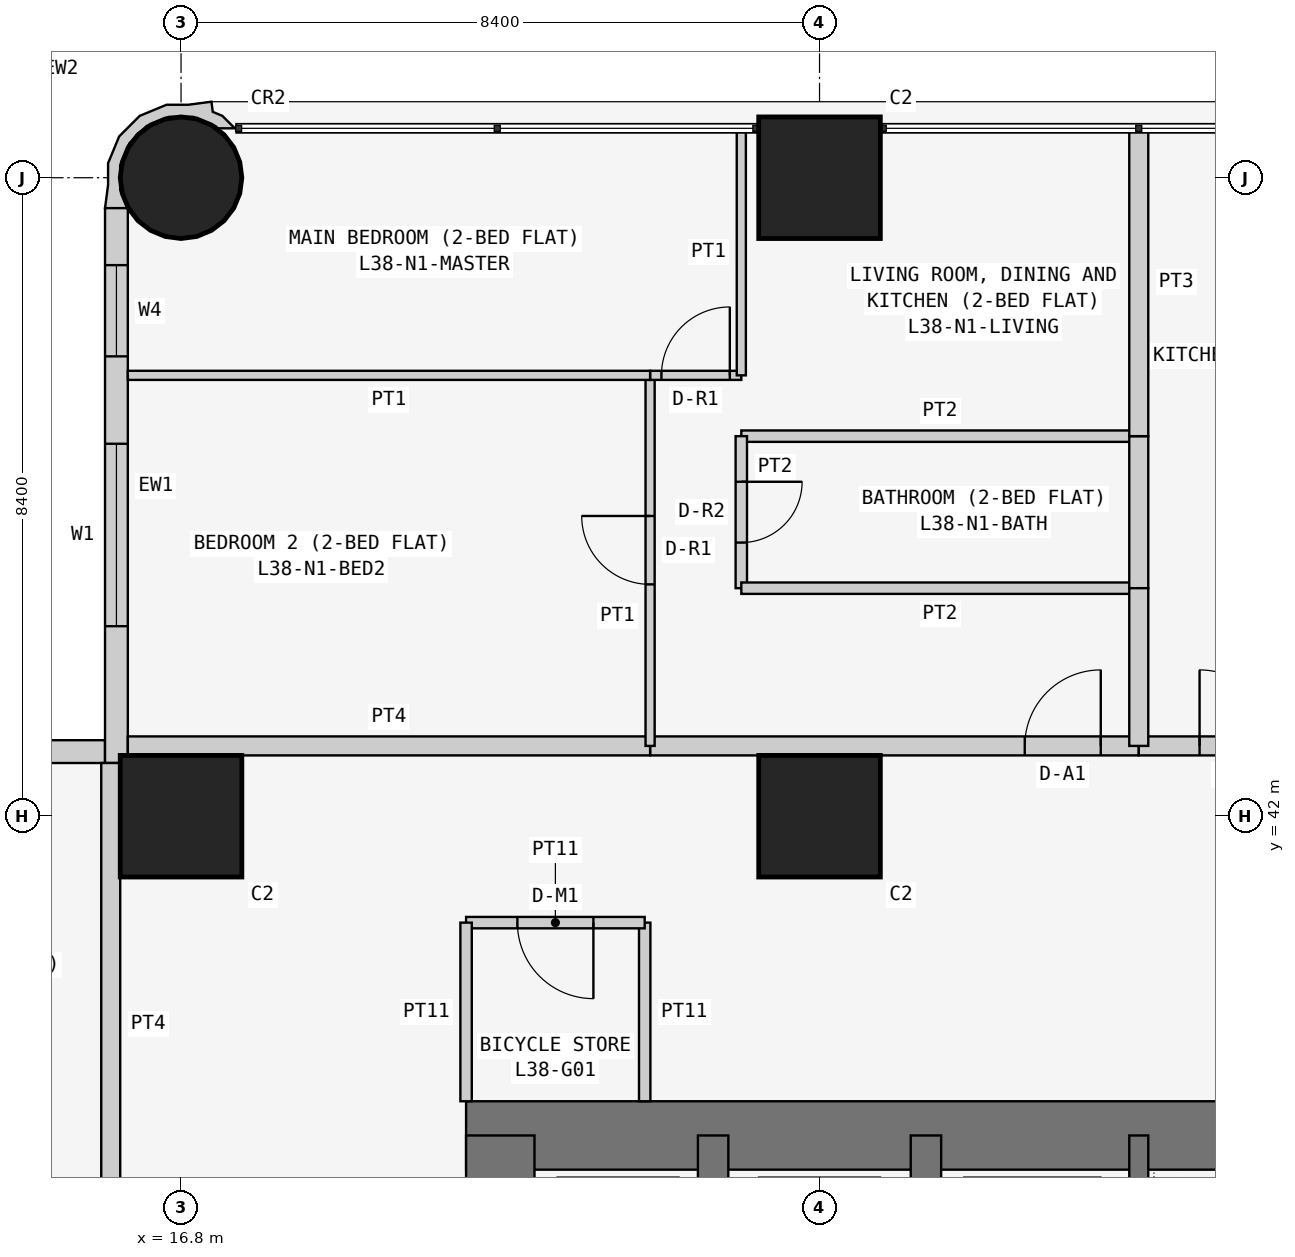
"""IFC4 building model, lengths in metres.
Left out: names, types, materials, properties, quantities, classifications, styles, units other than length and angle.
Written with IfcOpenShell. Run it as: python <this file> out.ifc"""

import sys

from ifc_helpers import new_model, si_unit, direction, frame, frame_2d, origin, origin_2d, place, context, subcontext, project, spatial, polyline, rectangle, circle, outline, extrude, element, fill, save


model = new_model("IFC4")
c1 = context("Model", 3, precision=1e-05, world=origin(), true_north=direction((0.0, 1.0)))
c2 = subcontext(c1, "Body", "Model", "MODEL_VIEW")
j1 = project(units=[si_unit("LENGTHUNIT", "METRE"), si_unit("PLANEANGLEUNIT", "RADIAN")], contexts=[c1])
p1 = place(None, origin())
s1 = spatial("IfcSite", under=j1, at=p1, CompositionType="ELEMENT")
p2 = place(p1, origin())
s2 = spatial("IfcBuilding", under=s1, at=p2, CompositionType="ELEMENT")
p3 = place(p2, frame((0.0, 0.0, 148.5)))
s3 = spatial("IfcBuildingStorey", under=s2, at=p3, CompositionType="ELEMENT", Elevation=148.5)
p4 = place(p3, frame((16.8, 42.0, 0.0), z_axis=(0.0, 0.0, 1.0), x_axis=(1.0, 0.0, 0.0)))
e1 = element("IfcColumn", 1, at=p4, inside=s3, PredefinedType="COLUMN", context=c2, shape_type="SweptSolid", body=[
    extrude(rectangle(XDim=1.6, YDim=1.6, at=origin_2d()), origin(), (0.0, 0.0, 1.0), 3.6),
])
p5 = place(p3, frame((16.8, 50.4, 0.0), z_axis=(0.0, 0.0, 1.0), x_axis=(1.0, 0.0, 0.0)))
e2 = element("IfcColumn", 2, at=p5, inside=s3, PredefinedType="COLUMN", context=c2, shape_type="SweptSolid", body=[
    extrude(circle(Radius=0.8, at=origin_2d()), origin(), (0.0, 0.0, 1.0), 3.6),
])
for number, where, z_axis, x_axis in (
    (3, (25.2, 42.0, 0.0), (0.0, 0.0, 1.0), (1.0, 0.0, 0.0)),
    (4, (25.2, 50.4, 0.0), (0.0, 0.0, 1.0), (1.0, 0.0, 0.0)),
):
    element("IfcColumn", number, at=place(p3, frame(where, z_axis=z_axis, x_axis=x_axis)), inside=s3, PredefinedType="COLUMN", context=c2, shape_type="SweptSolid", body=[
        extrude(rectangle(XDim=1.6, YDim=1.6, at=origin_2d()), origin(), (0.0, 0.0, 1.0), 3.6),
    ])
p6 = place(p3, frame((37.8, 37.8, 0.0), z_axis=(0.0, 0.0, 1.0), x_axis=(-1.0, 0.0, 0.0)))
e5 = element("IfcWall", 5, at=p6, inside=s3, PredefinedType="SHEAR", context=c2, shape_type="SweptSolid", body=[
    extrude(rectangle(XDim=17.25, YDim=0.9, at=frame_2d((8.625, 0.0))), origin(), (0.0, 0.0, 1.0), 3.6),
])
p7 = place(p3, frame((21.0, 37.8, 0.0), z_axis=(0.0, 0.0, 1.0), x_axis=(0.0, -1.0, 0.0)))
e6 = element("IfcWall", 6, at=p7, inside=s3, PredefinedType="SHEAR", context=c2, shape_type="SweptSolid", body=[
    extrude(rectangle(XDim=17.25, YDim=0.9, at=frame_2d((8.625, 0.0))), origin(), (0.0, 0.0, 1.0), 3.6),
])
p8 = place(p7, frame((5.4, 0.0, 0.0)))
e7 = element("IfcOpeningElement", 7, at=p8, cuts=e6, PredefinedType="OPENING", context=c2, shape_type="SweptSolid", body=[
    extrude(rectangle(XDim=1.2, YDim=2.1, at=frame_2d((0.6, 1.05))), frame((0.0, 0.46, 0.0), z_axis=(0.0, -1.0, 0.0), x_axis=(1.0, 0.0, 0.0)), (0.0, 0.0, 1.0), 0.92),
])
p9 = place(p3, frame((26.6, 21.0, 0.0), z_axis=(0.0, 0.0, 1.0), x_axis=(0.0, 1.0, 0.0)))
e8 = element("IfcWall", 8, at=p9, inside=s3, PredefinedType="SHEAR", context=c2, shape_type="SweptSolid", body=[
    extrude(rectangle(XDim=16.8, YDim=0.4, at=frame_2d((8.4, 0.0))), origin(), (0.0, 0.0, 1.0), 3.6),
])
p10 = place(p9, frame((10.4, 0.0, 0.0)))
e9 = element("IfcOpeningElement", 9, at=p10, cuts=e8, PredefinedType="OPENING", context=c2, shape_type="SweptSolid", body=[
    extrude(rectangle(XDim=1.2, YDim=2.1, at=frame_2d((0.6, 1.05))), frame((0.0, 0.21, 0.0), z_axis=(0.0, -1.0, 0.0), x_axis=(1.0, 0.0, 0.0)), (0.0, 0.0, 1.0), 0.42),
])
p11 = place(p3, frame((23.8, 34.6, 0.0), z_axis=(0.0, 0.0, 1.0), x_axis=(0.0, 1.0, 0.0)))
e10 = element("IfcWall", 10, at=p11, inside=s3, PredefinedType="SHEAR", context=c2, shape_type="SweptSolid", body=[
    extrude(rectangle(XDim=3.2, YDim=0.4, at=frame_2d((1.6, 0.0))), origin(), (0.0, 0.0, 1.0), 3.6),
])
p12 = place(p3, frame((29.4, 34.6, 0.0), z_axis=(0.0, 0.0, 1.0), x_axis=(0.0, 1.0, 0.0)))
e11 = element("IfcWall", 11, at=p12, inside=s3, PredefinedType="SHEAR", context=c2, shape_type="SweptSolid", body=[
    extrude(rectangle(XDim=3.2, YDim=0.25, at=frame_2d((1.6, 0.0))), origin(), (0.0, 0.0, 1.0), 3.6),
])
p13 = place(p3, frame((15.8, 42.85, 0.0), z_axis=(0.0, 0.0, 1.0), x_axis=(-1.0, 0.0, 0.0)))
e12 = element("IfcWall", 12, at=p13, inside=s3, PredefinedType="SOLIDWALL", context=c2, shape_type="SweptSolid", body=[
    extrude(rectangle(XDim=15.4, YDim=0.3, at=frame_2d((7.7, 0.0))), origin(), (0.0, 0.0, 1.0), 3.45),
])
p14 = place(p13, frame((1.2, 0.0, 0.9)))
e13 = element("IfcOpeningElement", 13, at=p14, cuts=e12, PredefinedType="OPENING", context=c2, shape_type="SweptSolid", body=[
    extrude(rectangle(XDim=1.8, YDim=1.5, at=frame_2d((0.9, 0.75))), frame((0.0, 0.16, 0.0), z_axis=(0.0, -1.0, 0.0), x_axis=(1.0, 0.0, 0.0)), (0.0, 0.0, 1.0), 0.32),
])
p15 = place(p13, frame((4.95, 0.0, 1.5)))
e14 = element("IfcOpeningElement", 14, at=p15, cuts=e12, PredefinedType="OPENING", context=c2, shape_type="SweptSolid", body=[
    extrude(rectangle(XDim=0.9, YDim=0.7, at=frame_2d((0.45, 0.35))), frame((0.0, 0.16, 0.0), z_axis=(0.0, -1.0, 0.0), x_axis=(1.0, 0.0, 0.0)), (0.0, 0.0, 1.0), 0.32),
])
p16 = place(p13, frame((8.5, 0.0, 0.9)))
e15 = element("IfcOpeningElement", 15, at=p16, cuts=e12, PredefinedType="OPENING", context=c2, shape_type="SweptSolid", body=[
    extrude(rectangle(XDim=1.8, YDim=1.5, at=frame_2d((0.9, 0.75))), frame((0.0, 0.16, 0.0), z_axis=(0.0, -1.0, 0.0), x_axis=(1.0, 0.0, 0.0)), (0.0, 0.0, 1.0), 0.32),
])
p17 = place(p13, frame((12.5, 0.0, 0.0)))
e16 = element("IfcOpeningElement", 16, at=p17, cuts=e12, PredefinedType="OPENING", context=c2, shape_type="SweptSolid", body=[
    extrude(rectangle(XDim=0.9, YDim=2.4, at=frame_2d((0.45, 1.2))), frame((0.0, 0.16, 0.0), z_axis=(0.0, -1.0, 0.0), x_axis=(1.0, 0.0, 0.0)), (0.0, 0.0, 1.0), 0.32),
])
p18 = place(p13, frame((13.5, 0.0, 0.9)))
e17 = element("IfcOpeningElement", 17, at=p18, cuts=e12, PredefinedType="OPENING", context=c2, shape_type="SweptSolid", body=[
    extrude(rectangle(XDim=1.2, YDim=1.5, at=frame_2d((0.6, 0.75))), frame((0.0, 0.16, 0.0), z_axis=(0.0, -1.0, 0.0), x_axis=(1.0, 0.0, 0.0)), (0.0, 0.0, 1.0), 0.32),
])
p19 = place(p3, frame((15.95, 50.0, 0.0), z_axis=(0.0, 0.0, 1.0), x_axis=(0.0, -1.0, 0.0)))
e18 = element("IfcWall", 18, at=p19, inside=s3, PredefinedType="SOLIDWALL", context=c2, shape_type="SweptSolid", body=[
    extrude(rectangle(XDim=7.3, YDim=0.3, at=frame_2d((3.65, 0.0))), origin(), (0.0, 0.0, 1.0), 3.45),
])
p20 = place(p19, frame((3.1, 0.0, 0.9)))
e19 = element("IfcOpeningElement", 19, at=p20, cuts=e18, PredefinedType="OPENING", context=c2, shape_type="SweptSolid", body=[
    extrude(rectangle(XDim=2.4, YDim=1.5, at=frame_2d((1.2, 0.75))), frame((0.0, 0.16, 0.0), z_axis=(0.0, -1.0, 0.0), x_axis=(1.0, 0.0, 0.0)), (0.0, 0.0, 1.0), 0.32),
])
p21 = place(p19, frame((0.75, 0.0, 0.9)))
e20 = element("IfcOpeningElement", 20, at=p21, cuts=e18, PredefinedType="OPENING", context=c2, shape_type="SweptSolid", body=[
    extrude(rectangle(XDim=1.2, YDim=1.5, at=frame_2d((0.6, 0.75))), frame((0.0, 0.16, 0.0), z_axis=(0.0, -1.0, 0.0), x_axis=(1.0, 0.0, 0.0)), (0.0, 0.0, 1.0), 0.32),
])
p22 = place(p3, frame((17.448, 50.995, 0.0), z_axis=(0.0, 0.0, 1.0), x_axis=(-0.343276641956, 0.93923434088, 0.0)))
e21 = element("IfcWall", 21, at=p22, inside=s3, PredefinedType="SOLIDWALL", context=c2, shape_type="SweptSolid", body=[
    extrude(outline(polyline([(0.241, 0.023), (0.333, 0.124), (0.465, 0.094), (0.532, 0.393), (0.631, 0.663), (0.614, 1.045), (0.454, 1.391), (0.172, 1.649), (-0.098, 1.748), (-0.369, 1.89), (-0.509, 1.621), (-0.491, 1.615), (-0.479, 1.609), (-0.211, 1.62), (0.088, 1.511), (0.323, 1.295), (0.457, 1.006), (0.47, 0.688), (0.361, 0.389), (0.145, 0.154), (0.108, 0.137), (0.031, -0.075), (0.241, 0.023)])), origin(), (0.0, 0.0, 1.0), 3.45),
])
p23 = place(p3, frame((22.9, 38.25, 0.0), z_axis=(0.0, 0.0, 1.0), x_axis=(0.0, 1.0, 0.0)))
e22 = element("IfcWall", 22, at=p23, inside=s3, PredefinedType="PARTITIONING", context=c2, shape_type="SweptSolid", body=[
    extrude(rectangle(XDim=2.35, YDim=0.15, at=frame_2d((1.175, 0.0))), origin(), (0.0, 0.0, 1.0), 3.45),
])
p24 = place(p3, frame((22.9, 40.6, 0.0), z_axis=(0.0, 0.0, 1.0), x_axis=(-1.0, 0.0, 0.0)))
e23 = element("IfcWall", 23, at=p24, inside=s3, PredefinedType="PARTITIONING", context=c2, shape_type="SweptSolid", body=[
    extrude(rectangle(XDim=2.35, YDim=0.15, at=frame_2d((1.175, 0.0))), origin(), (0.0, 0.0, 1.0), 3.45),
])
p25 = place(p24, frame((0.675, 0.0, 0.0)))
e24 = element("IfcOpeningElement", 24, at=p25, cuts=e23, PredefinedType="OPENING", context=c2, shape_type="SweptSolid", body=[
    extrude(rectangle(XDim=1.0, YDim=2.1, at=frame_2d((0.5, 1.05))), frame((0.0, 0.085, 0.0), z_axis=(0.0, -1.0, 0.0), x_axis=(1.0, 0.0, 0.0)), (0.0, 0.0, 1.0), 0.17),
])
p26 = place(p3, frame((20.55, 40.6, 0.0), z_axis=(0.0, 0.0, 1.0), x_axis=(0.0, -1.0, 0.0)))
e25 = element("IfcWall", 25, at=p26, inside=s3, PredefinedType="PARTITIONING", context=c2, shape_type="SweptSolid", body=[
    extrude(rectangle(XDim=2.35, YDim=0.15, at=frame_2d((1.175, 0.0))), origin(), (0.0, 0.0, 1.0), 3.45),
])
p27 = place(p3, frame((22.971, 42.925, 0.0), z_axis=(0.0, 0.0, 1.0), x_axis=(1.0, 0.0, 0.0)))
e26 = element("IfcWall", 26, at=p27, inside=s3, PredefinedType="PARTITIONING", context=c2, shape_type="SweptSolid", body=[
    extrude(rectangle(XDim=6.429, YDim=0.25, at=frame_2d((3.214, 0.0))), origin(), (0.0, 0.0, 1.0), 3.45),
])
p28 = place(p27, frame((4.929, 0.0, 0.0)))
e27 = element("IfcOpeningElement", 27, at=p28, cuts=e26, PredefinedType="OPENING", context=c2, shape_type="SweptSolid", body=[
    extrude(rectangle(XDim=1.0, YDim=2.1, at=frame_2d((0.5, 1.05))), frame((0.0, 0.135, 0.0), z_axis=(0.0, -1.0, 0.0), x_axis=(1.0, 0.0, 0.0)), (0.0, 0.0, 1.0), 0.27),
])
p29 = place(p3, frame((16.1, 42.925, 0.0), z_axis=(0.0, 0.0, 1.0), x_axis=(1.0, 0.0, 0.0)))
e28 = element("IfcWall", 28, at=p29, inside=s3, PredefinedType="PARTITIONING", context=c2, shape_type="SweptSolid", body=[
    extrude(rectangle(XDim=6.871, YDim=0.25, at=frame_2d((3.436, 0.0))), origin(), (0.0, 0.0, 1.0), 3.45),
])
p30 = place(p3, frame((29.4, 42.925, 0.0), z_axis=(0.0, 0.0, 1.0), x_axis=(1.0, 0.0, 0.0)))
e29 = element("IfcWall", 29, at=p30, inside=s3, PredefinedType="PARTITIONING", context=c2, shape_type="SweptSolid", body=[
    extrude(rectangle(XDim=2.6, YDim=0.25, at=frame_2d((1.3, 0.0))), origin(), (0.0, 0.0, 1.0), 3.45),
])
p31 = place(p30, frame((0.8, 0.0, 0.0)))
e30 = element("IfcOpeningElement", 30, at=p31, cuts=e29, PredefinedType="OPENING", context=c2, shape_type="SweptSolid", body=[
    extrude(rectangle(XDim=1.0, YDim=2.1, at=frame_2d((0.5, 1.05))), frame((0.0, 0.135, 0.0), z_axis=(0.0, -1.0, 0.0), x_axis=(1.0, 0.0, 0.0)), (0.0, 0.0, 1.0), 0.27),
])
p32 = place(p3, frame((15.875, 35.829, 0.0), z_axis=(0.0, 0.0, 1.0), x_axis=(0.0, 1.0, 0.0)))
e31 = element("IfcWall", 31, at=p32, inside=s3, PredefinedType="PARTITIONING", context=c2, shape_type="SweptSolid", body=[
    extrude(rectangle(XDim=6.871, YDim=0.25, at=frame_2d((3.436, 0.0))), origin(), (0.0, 0.0, 1.0), 3.45),
])
p33 = place(p3, frame((29.4, 47.0, 0.0), z_axis=(0.0, 0.0, 1.0), x_axis=(-1.0, 0.0, 0.0)))
e32 = element("IfcWall", 32, at=p33, inside=s3, PredefinedType="PARTITIONING", context=c2, shape_type="SweptSolid", body=[
    extrude(rectangle(XDim=5.229, YDim=0.15, at=frame_2d((2.615, 0.0))), origin(), (0.0, 0.0, 1.0), 3.45),
])
p34 = place(p3, frame((24.171, 47.0, 0.0), z_axis=(0.0, 0.0, 1.0), x_axis=(0.0, -1.0, 0.0)))
e33 = element("IfcWall", 33, at=p34, inside=s3, PredefinedType="PARTITIONING", context=c2, shape_type="SweptSolid", body=[
    extrude(rectangle(XDim=2.0, YDim=0.15, at=frame_2d((1.0, 0.0))), origin(), (0.0, 0.0, 1.0), 3.45),
])
p35 = place(p34, frame((0.6, 0.0, 0.0)))
e34 = element("IfcOpeningElement", 34, at=p35, cuts=e33, PredefinedType="OPENING", context=c2, shape_type="SweptSolid", body=[
    extrude(rectangle(XDim=0.8, YDim=2.1, at=frame_2d((0.4, 1.05))), frame((0.0, 0.085, 0.0), z_axis=(0.0, -1.0, 0.0), x_axis=(1.0, 0.0, 0.0)), (0.0, 0.0, 1.0), 0.17),
])
p36 = place(p3, frame((24.171, 45.0, 0.0), z_axis=(0.0, 0.0, 1.0), x_axis=(1.0, 0.0, 0.0)))
e35 = element("IfcWall", 35, at=p36, inside=s3, PredefinedType="PARTITIONING", context=c2, shape_type="SweptSolid", body=[
    extrude(rectangle(XDim=5.229, YDim=0.15, at=frame_2d((2.615, 0.0))), origin(), (0.0, 0.0, 1.0), 3.45),
])
p37 = place(p3, frame((29.4, 45.0, 0.0), z_axis=(0.0, 0.0, 1.0), x_axis=(0.0, 1.0, 0.0)))
e36 = element("IfcWall", 36, at=p37, inside=s3, PredefinedType="PARTITIONING", context=c2, shape_type="SweptSolid", body=[
    extrude(rectangle(XDim=2.0, YDim=0.25, at=frame_2d((1.0, 0.0))), origin(), (0.0, 0.0, 1.0), 2.848),
])
p38 = place(p3, frame((22.971, 42.925, 0.0), z_axis=(0.0, 0.0, 1.0), x_axis=(0.0, 1.0, 0.0)))
e37 = element("IfcWall", 37, at=p38, inside=s3, PredefinedType="PARTITIONING", context=c2, shape_type="SweptSolid", body=[
    extrude(rectangle(XDim=4.875, YDim=0.12, at=frame_2d((2.438, 0.0))), origin(), (0.0, 0.0, 1.0), 3.45),
])
p39 = place(p38, frame((2.125, 0.0, 0.0)))
e38 = element("IfcOpeningElement", 38, at=p39, cuts=e37, PredefinedType="OPENING", context=c2, shape_type="SweptSolid", body=[
    extrude(rectangle(XDim=0.9, YDim=2.1, at=frame_2d((0.45, 1.05))), frame((0.0, 0.07, 0.0), z_axis=(0.0, -1.0, 0.0), x_axis=(1.0, 0.0, 0.0)), (0.0, 0.0, 1.0), 0.14),
])
p40 = place(p3, frame((22.971, 47.8, 0.0), z_axis=(0.0, 0.0, 1.0), x_axis=(1.0, 0.0, 0.0)))
e39 = element("IfcWall", 39, at=p40, inside=s3, PredefinedType="PARTITIONING", context=c2, shape_type="SweptSolid", body=[
    extrude(rectangle(XDim=1.2, YDim=0.12, at=frame_2d((0.6, 0.0))), origin(), (0.0, 0.0, 1.0), 3.45),
])
p41 = place(p40, frame((0.149, 0.0, 0.0)))
e40 = element("IfcOpeningElement", 40, at=p41, cuts=e39, PredefinedType="OPENING", context=c2, shape_type="SweptSolid", body=[
    extrude(rectangle(XDim=0.9, YDim=2.1, at=frame_2d((0.45, 1.05))), frame((0.0, 0.07, 0.0), z_axis=(0.0, -1.0, 0.0), x_axis=(1.0, 0.0, 0.0)), (0.0, 0.0, 1.0), 0.14),
])
p42 = place(p3, frame((24.171, 47.8, 0.0), z_axis=(0.0, 0.0, 1.0), x_axis=(0.0, 1.0, 0.0)))
e41 = element("IfcWall", 41, at=p42, inside=s3, PredefinedType="PARTITIONING", context=c2, shape_type="SweptSolid", body=[
    extrude(rectangle(XDim=3.25, YDim=0.12, at=frame_2d((1.625, 0.0))), origin(), (0.0, 0.0, 1.0), 3.45),
])
p43 = place(p3, frame((29.4, 45.0, 0.0), z_axis=(0.0, 0.0, 1.0), x_axis=(0.0, -1.0, 0.0)))
e42 = element("IfcWall", 42, at=p43, inside=s3, PredefinedType="PARTITIONING", context=c2, shape_type="SweptSolid", body=[
    extrude(rectangle(XDim=2.075, YDim=0.25, at=frame_2d((1.038, 0.0))), origin(), (0.0, 0.0, 1.0), 2.848),
])
p44 = place(p3, frame((29.4, 51.05, 0.0), z_axis=(0.0, 0.0, 1.0), x_axis=(0.0, -1.0, 0.0)))
e43 = element("IfcWall", 43, at=p44, inside=s3, PredefinedType="PARTITIONING", context=c2, shape_type="SweptSolid", body=[
    extrude(rectangle(XDim=4.05, YDim=0.25, at=frame_2d((2.025, 0.0))), origin(), (0.0, 0.0, 1.0), 2.848),
])
p45 = place(p3, frame((22.971, 47.8, 0.0), z_axis=(0.0, 0.0, 1.0), x_axis=(-1.0, 0.0, 0.0)))
e44 = element("IfcWall", 44, at=p45, inside=s3, PredefinedType="PARTITIONING", context=c2, shape_type="SweptSolid", body=[
    extrude(rectangle(XDim=6.871, YDim=0.12, at=frame_2d((3.436, 0.0))), origin(), (0.0, 0.0, 1.0), 3.45),
])
p46 = place(p20, origin())
e45 = element("IfcWindow", 45, at=p46, inside=s3, PartitioningType="SINGLE_PANEL", PredefinedType="WINDOW", context=c2, shape_type="SweptSolid", body=[
    extrude(rectangle(XDim=2.4, YDim=1.5, at=frame_2d((1.2, 0.75))), frame((0.0, 0.03, 0.0), z_axis=(0.0, -1.0, 0.0), x_axis=(1.0, 0.0, 0.0)), (0.0, 0.0, 1.0), 0.06),
])
fill(e19, e45)
p47 = place(p21, origin())
e46 = element("IfcWindow", 46, at=p47, inside=s3, PartitioningType="SINGLE_PANEL", PredefinedType="WINDOW", context=c2, shape_type="SweptSolid", body=[
    extrude(rectangle(XDim=1.2, YDim=1.5, at=frame_2d((0.6, 0.75))), frame((0.0, 0.03, 0.0), z_axis=(0.0, -1.0, 0.0), x_axis=(1.0, 0.0, 0.0)), (0.0, 0.0, 1.0), 0.06),
])
fill(e20, e46)
p48 = place(p25, origin())
e47 = element("IfcDoor", 47, at=p48, inside=s3, OperationType="SINGLE_SWING_LEFT", PredefinedType="DOOR", context=c2, shape_type="SweptSolid", body=[
    extrude(rectangle(XDim=1.0, YDim=2.1, at=frame_2d((0.5, 1.05))), frame((0.0, 0.025, 0.0), z_axis=(0.0, -1.0, 0.0), x_axis=(1.0, 0.0, 0.0)), (0.0, 0.0, 1.0), 0.05),
])
fill(e24, e47)
p49 = place(p28, origin())
e48 = element("IfcDoor", 48, at=p49, inside=s3, OperationType="SINGLE_SWING_RIGHT", PredefinedType="DOOR", context=c2, shape_type="SweptSolid", body=[
    extrude(rectangle(XDim=1.0, YDim=2.1, at=frame_2d((0.5, 1.05))), frame((0.0, 0.025, 0.0), z_axis=(0.0, -1.0, 0.0), x_axis=(1.0, 0.0, 0.0)), (0.0, 0.0, 1.0), 0.05),
])
fill(e27, e48)
p50 = place(p35, origin())
e49 = element("IfcDoor", 49, at=p50, inside=s3, OperationType="SINGLE_SWING_LEFT", PredefinedType="DOOR", context=c2, shape_type="SweptSolid", body=[
    extrude(rectangle(XDim=0.8, YDim=2.1, at=frame_2d((0.4, 1.05))), frame((0.0, 0.025, 0.0), z_axis=(0.0, -1.0, 0.0), x_axis=(1.0, 0.0, 0.0)), (0.0, 0.0, 1.0), 0.05),
])
fill(e34, e49)
p51 = place(p39, origin())
e50 = element("IfcDoor", 50, at=p51, inside=s3, OperationType="SINGLE_SWING_RIGHT", PredefinedType="DOOR", context=c2, shape_type="SweptSolid", body=[
    extrude(rectangle(XDim=0.9, YDim=2.1, at=frame_2d((0.45, 1.05))), frame((0.0, 0.025, 0.0), z_axis=(0.0, -1.0, 0.0), x_axis=(1.0, 0.0, 0.0)), (0.0, 0.0, 1.0), 0.05),
])
fill(e38, e50)
p52 = place(p41, origin())
e51 = element("IfcDoor", 51, at=p52, inside=s3, OperationType="SINGLE_SWING_RIGHT", PredefinedType="DOOR", context=c2, shape_type="SweptSolid", body=[
    extrude(rectangle(XDim=0.9, YDim=2.1, at=frame_2d((0.45, 1.05))), frame((0.0, 0.025, 0.0), z_axis=(0.0, -1.0, 0.0), x_axis=(1.0, 0.0, 0.0)), (0.0, 0.0, 1.0), 0.05),
])
fill(e40, e51)
p53 = place(p31, origin())
e52 = element("IfcDoor", 52, at=p53, inside=s3, OperationType="SINGLE_SWING_LEFT", PredefinedType="DOOR", context=c2, shape_type="SweptSolid", body=[
    extrude(rectangle(XDim=1.0, YDim=2.1, at=frame_2d((0.5, 1.05))), frame((0.0, 0.025, 0.0), z_axis=(0.0, -1.0, 0.0), x_axis=(1.0, 0.0, 0.0)), (0.0, 0.0, 1.0), 0.05),
])
fill(e30, e52)
save(model, sys.argv[1])
